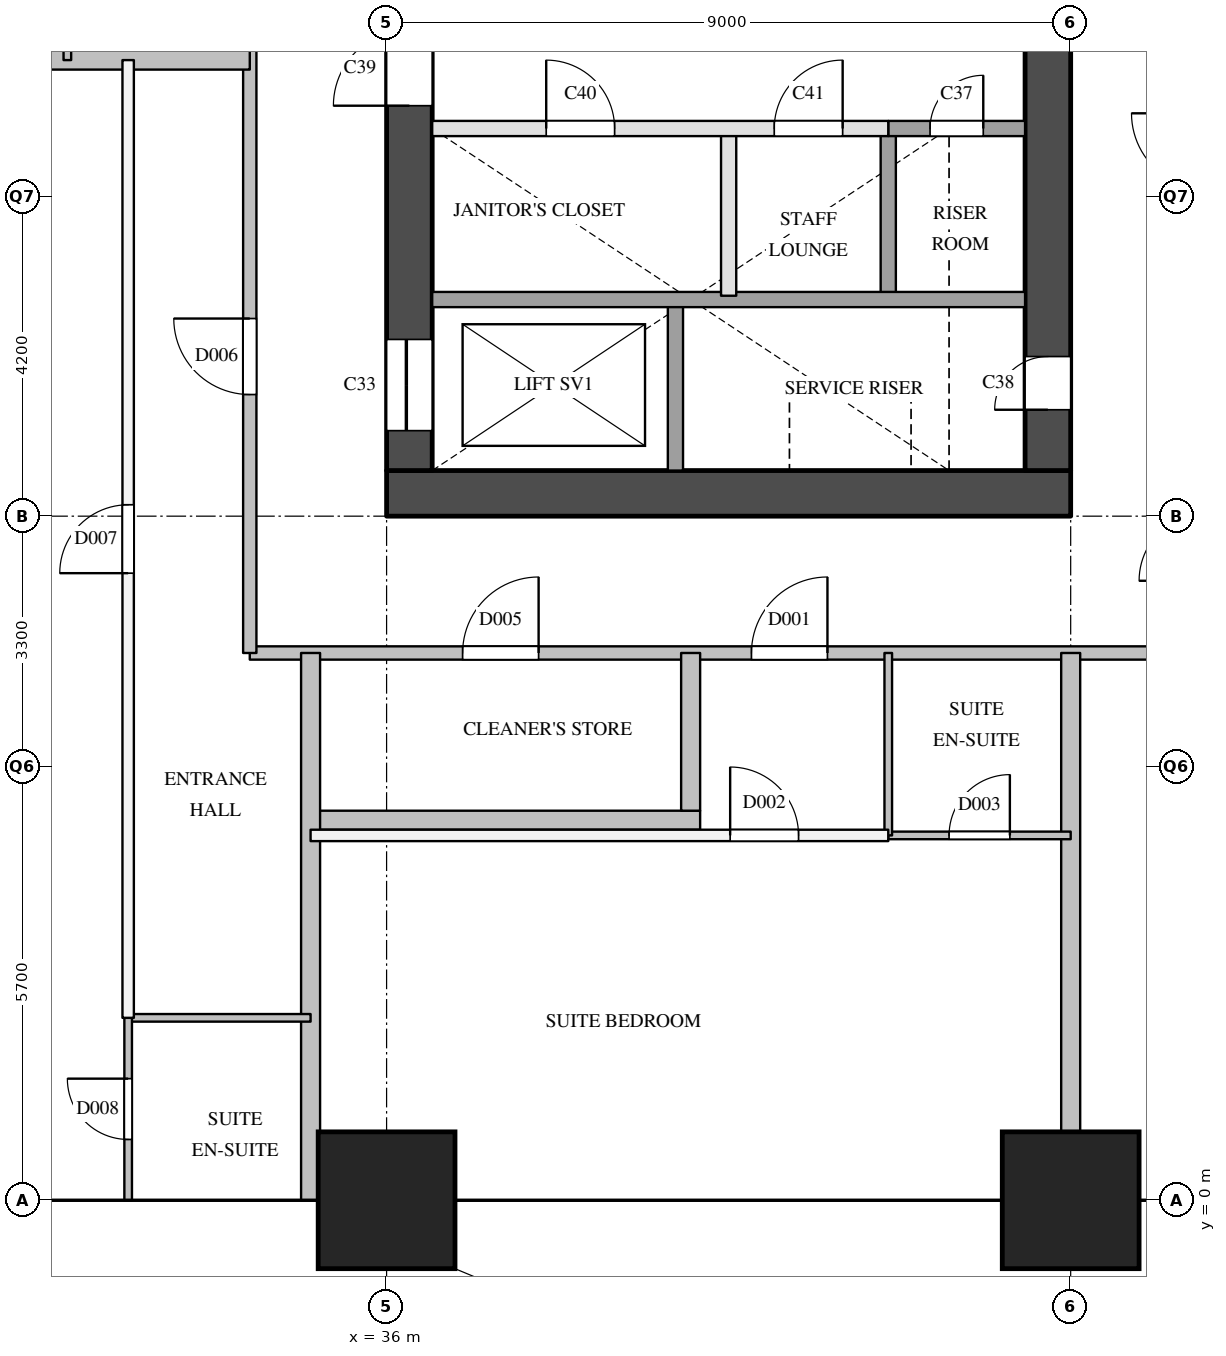
"""IFC4 building model, lengths in metres.
Left out: names, types, materials, properties, quantities, classifications, styles, units other than length and angle.
Written with IfcOpenShell. Run it as: python <this file> out.ifc"""

import sys

from ifc_helpers import new_model, si_unit, direction, frame, frame_2d, origin, origin_2d, place, context, subcontext, project, spatial, rectangle, extrude, element, fill, save


model = new_model("IFC4")
c1 = context("Model", 3, precision=1e-05, world=origin(), true_north=direction((0.0, 1.0)))
c2 = subcontext(c1, "Body", "Model", "MODEL_VIEW")
j1 = project(units=[si_unit("LENGTHUNIT", "METRE"), si_unit("PLANEANGLEUNIT", "RADIAN")], contexts=[c1])
p1 = place(None, origin())
s1 = spatial("IfcSite", under=j1, at=p1, CompositionType="ELEMENT")
p2 = place(p1, origin())
s2 = spatial("IfcBuilding", under=s1, at=p2, CompositionType="ELEMENT")
p3 = place(p2, frame((0.0, 0.0, 119.6)))
s3 = spatial("IfcBuildingStorey", under=s2, at=p3, CompositionType="ELEMENT", Elevation=119.6)
for number, where, z_axis, x_axis in (
    (1, (36.0, 0.0, 0.0), (0.0, 0.0, 1.0), (1.0, 0.0, 0.0)),
    (2, (45.0, 0.0, 0.0), (0.0, 0.0, 1.0), (1.0, 0.0, 0.0)),
):
    element("IfcColumn", number, at=place(p3, frame(where, z_axis=z_axis, x_axis=x_axis)), inside=s3, PredefinedType="COLUMN", context=c2, shape_type="SweptSolid", body=[
        extrude(rectangle(XDim=1.8, YDim=1.8, at=origin_2d()), origin(), (0.0, 0.0, 1.0), 3.8),
    ])
p4 = place(p3, frame((36.0, 9.3, 0.0), z_axis=(0.0, 0.0, 1.0), x_axis=(1.0, 0.0, 0.0)))
e3 = element("IfcWall", 3, at=p4, inside=s3, PredefinedType="SHEAR", context=c2, shape_type="SweptSolid", body=[
    extrude(rectangle(XDim=9.0, YDim=0.6, at=frame_2d((4.5, 0.0))), origin(), (0.0, 0.0, 1.0), 3.3),
])
p5 = place(p3, frame((36.3, 9.6, 0.0), z_axis=(0.0, 0.0, 1.0), x_axis=(0.0, 1.0, 0.0)))
e4 = element("IfcWall", 4, at=p5, inside=s3, PredefinedType="SHEAR", context=c2, shape_type="SweptSolid", body=[
    extrude(rectangle(XDim=12.3, YDim=0.6, at=frame_2d((6.15, 0.0))), origin(), (0.0, 0.0, 1.0), 3.3),
])
p6 = place(p5, frame((0.525, 0.0, 0.0)))
e5 = element("IfcOpeningElement", 5, at=p6, cuts=e4, PredefinedType="OPENING", context=c2, shape_type="SweptSolid", body=[
    extrude(rectangle(XDim=1.2, YDim=2.1, at=frame_2d((0.6, 1.05))), frame((0.0, 0.31, 0.0), z_axis=(0.0, -1.0, 0.0), x_axis=(1.0, 0.0, 0.0)), (0.0, 0.0, 1.0), 0.62),
])
p7 = place(p5, frame((4.8, 0.0, 0.0)))
e6 = element("IfcOpeningElement", 6, at=p7, cuts=e4, PredefinedType="OPENING", context=c2, shape_type="SweptSolid", body=[
    extrude(rectangle(XDim=1.0, YDim=2.1, at=frame_2d((0.5, 1.05))), frame((0.0, 0.31, 0.0), z_axis=(0.0, -1.0, 0.0), x_axis=(1.0, 0.0, 0.0)), (0.0, 0.0, 1.0), 0.62),
])
p8 = place(p3, frame((44.7, 9.6, 0.0), z_axis=(0.0, 0.0, 1.0), x_axis=(0.0, 1.0, 0.0)))
e7 = element("IfcWall", 7, at=p8, inside=s3, PredefinedType="SHEAR", context=c2, shape_type="SweptSolid", body=[
    extrude(rectangle(XDim=12.3, YDim=0.6, at=frame_2d((6.15, 0.0))), origin(), (0.0, 0.0, 1.0), 3.3),
])
p9 = place(p8, frame((0.8, 0.0, 0.0)))
e8 = element("IfcOpeningElement", 8, at=p9, cuts=e7, PredefinedType="OPENING", context=c2, shape_type="SweptSolid", body=[
    extrude(rectangle(XDim=0.7, YDim=2.1, at=frame_2d((0.35, 1.05))), frame((0.0, 0.31, 0.0), z_axis=(0.0, -1.0, 0.0), x_axis=(1.0, 0.0, 0.0)), (0.0, 0.0, 1.0), 0.62),
])
p10 = place(p3, frame((39.8, 9.6, 0.0), z_axis=(0.0, 0.0, 1.0), x_axis=(0.0, 1.0, 0.0)))
e9 = element("IfcWall", 9, at=p10, inside=s3, PredefinedType="SOLIDWALL", context=c2, shape_type="SweptSolid", body=[
    extrude(rectangle(XDim=2.3, YDim=0.2, at=frame_2d((1.15, 0.0))), origin(), (0.0, 0.0, 1.0), 3.3),
])
p11 = place(p3, frame((40.5, 11.9, 0.0), z_axis=(0.0, 0.0, 1.0), x_axis=(0.0, 1.0, 0.0)))
e10 = element("IfcWall", 10, at=p11, inside=s3, PredefinedType="PARTITIONING", context=c2, shape_type="SweptSolid", body=[
    extrude(rectangle(XDim=2.2, YDim=0.2, at=frame_2d((1.1, 0.0))), origin(), (0.0, 0.0, 1.0), 3.3),
])
p12 = place(p3, frame((42.6, 11.9, 0.0), z_axis=(0.0, 0.0, 1.0), x_axis=(0.0, 1.0, 0.0)))
e11 = element("IfcWall", 11, at=p12, inside=s3, PredefinedType="SOLIDWALL", context=c2, shape_type="SweptSolid", body=[
    extrude(rectangle(XDim=2.2, YDim=0.2, at=frame_2d((1.1, 0.0))), origin(), (0.0, 0.0, 1.0), 3.3),
])
p13 = place(p3, frame((36.6, 11.85, 0.0), z_axis=(0.0, 0.0, 1.0), x_axis=(1.0, 0.0, 0.0)))
e12 = element("IfcWall", 12, at=p13, inside=s3, PredefinedType="SOLIDWALL", context=c2, shape_type="SweptSolid", body=[
    extrude(rectangle(XDim=7.8, YDim=0.2, at=frame_2d((3.9, 0.0))), origin(), (0.0, 0.0, 1.0), 3.3),
])
p14 = place(p3, frame((36.6, 14.1, 0.0), z_axis=(0.0, 0.0, 1.0), x_axis=(1.0, 0.0, 0.0)))
e13 = element("IfcWall", 13, at=p14, inside=s3, PredefinedType="PARTITIONING", context=c2, shape_type="SweptSolid", body=[
    extrude(rectangle(XDim=6.0, YDim=0.2, at=frame_2d((3.0, 0.0))), origin(), (0.0, 0.0, 1.0), 3.3),
])
p15 = place(p14, frame((1.5, 0.0, 0.0)))
e14 = element("IfcOpeningElement", 14, at=p15, cuts=e13, PredefinedType="OPENING", context=c2, shape_type="SweptSolid", body=[
    extrude(rectangle(XDim=0.9, YDim=2.1, at=frame_2d((0.45, 1.05))), frame((0.0, 0.11, 0.0), z_axis=(0.0, -1.0, 0.0), x_axis=(1.0, 0.0, 0.0)), (0.0, 0.0, 1.0), 0.22),
])
p16 = place(p14, frame((4.5, 0.0, 0.0)))
e15 = element("IfcOpeningElement", 15, at=p16, cuts=e13, PredefinedType="OPENING", context=c2, shape_type="SweptSolid", body=[
    extrude(rectangle(XDim=0.9, YDim=2.1, at=frame_2d((0.45, 1.05))), frame((0.0, 0.11, 0.0), z_axis=(0.0, -1.0, 0.0), x_axis=(1.0, 0.0, 0.0)), (0.0, 0.0, 1.0), 0.22),
])
p17 = place(p3, frame((42.6, 14.1, 0.0), z_axis=(0.0, 0.0, 1.0), x_axis=(1.0, 0.0, 0.0)))
e16 = element("IfcWall", 16, at=p17, inside=s3, PredefinedType="SOLIDWALL", context=c2, shape_type="SweptSolid", body=[
    extrude(rectangle(XDim=1.8, YDim=0.2, at=frame_2d((0.9, 0.0))), origin(), (0.0, 0.0, 1.0), 3.3),
])
p18 = place(p17, frame((0.55, 0.0, 0.0)))
e17 = element("IfcOpeningElement", 17, at=p18, cuts=e16, PredefinedType="OPENING", context=c2, shape_type="SweptSolid", body=[
    extrude(rectangle(XDim=0.7, YDim=2.1, at=frame_2d((0.35, 1.05))), frame((0.0, 0.11, 0.0), z_axis=(0.0, -1.0, 0.0), x_axis=(1.0, 0.0, 0.0)), (0.0, 0.0, 1.0), 0.22),
])
p19 = place(p3, frame((34.2, 7.2, 0.0), z_axis=(0.0, 0.0, 1.0), x_axis=(1.0, 0.0, 0.0)))
e18 = element("IfcWall", 18, at=p19, inside=s3, PredefinedType="PARTITIONING", context=c2, shape_type="SweptSolid", body=[
    extrude(rectangle(XDim=12.6, YDim=0.175, at=frame_2d((6.3, 0.0))), origin(), (0.0, 0.0, 1.0), 3.3),
])
p20 = place(p19, frame((6.6, 0.0, 0.0)))
e19 = element("IfcOpeningElement", 19, at=p20, cuts=e18, PredefinedType="OPENING", context=c2, shape_type="SweptSolid", body=[
    extrude(rectangle(XDim=1.0, YDim=2.1, at=frame_2d((0.5, 1.05))), frame((0.0, 0.097, 0.0), z_axis=(0.0, -1.0, 0.0), x_axis=(1.0, 0.0, 0.0)), (0.0, 0.0, 1.0), 0.195),
])
p21 = place(p19, frame((2.8, 0.0, 0.0)))
e20 = element("IfcOpeningElement", 20, at=p21, cuts=e18, PredefinedType="OPENING", context=c2, shape_type="SweptSolid", body=[
    extrude(rectangle(XDim=1.0, YDim=2.1, at=frame_2d((0.5, 1.05))), frame((0.0, 0.097, 0.0), z_axis=(0.0, -1.0, 0.0), x_axis=(1.0, 0.0, 0.0)), (0.0, 0.0, 1.0), 0.195),
])
p22 = place(p3, frame((34.2, 7.2, 0.0), z_axis=(0.0, 0.0, 1.0), x_axis=(0.0, 1.0, 0.0)))
e21 = element("IfcWall", 21, at=p22, inside=s3, PredefinedType="PARTITIONING", context=c2, shape_type="SweptSolid", body=[
    extrude(rectangle(XDim=16.49, YDim=0.175, at=frame_2d((8.245, 0.0))), origin(), (0.0, 0.0, 1.0), 3.3),
])
p23 = place(p22, frame((3.4, 0.0, 0.0)))
e22 = element("IfcOpeningElement", 22, at=p23, cuts=e21, PredefinedType="OPENING", context=c2, shape_type="SweptSolid", body=[
    extrude(rectangle(XDim=1.0, YDim=2.1, at=frame_2d((0.5, 1.05))), frame((0.0, 0.097, 0.0), z_axis=(0.0, -1.0, 0.0), x_axis=(1.0, 0.0, 0.0)), (0.0, 0.0, 1.0), 0.195),
])
p24 = place(p22, frame((11.0, 0.0, 0.0)))
e23 = element("IfcOpeningElement", 23, at=p24, cuts=e21, PredefinedType="OPENING", context=c2, shape_type="SweptSolid", body=[
    extrude(rectangle(XDim=1.0, YDim=2.1, at=frame_2d((0.5, 1.05))), frame((0.0, 0.097, 0.0), z_axis=(0.0, -1.0, 0.0), x_axis=(1.0, 0.0, 0.0)), (0.0, 0.0, 1.0), 0.195),
])
p25 = place(p22, frame((14.195, 0.0, 0.0)))
e24 = element("IfcOpeningElement", 24, at=p25, cuts=e21, PredefinedType="OPENING", context=c2, shape_type="SweptSolid", body=[
    extrude(rectangle(XDim=0.9, YDim=2.1, at=frame_2d((0.45, 1.05))), frame((0.0, 0.097, 0.0), z_axis=(0.0, -1.0, 0.0), x_axis=(1.0, 0.0, 0.0)), (0.0, 0.0, 1.0), 0.195),
])
p26 = place(p3, frame((35.0, 4.8, 0.0), z_axis=(0.0, 0.0, 1.0), x_axis=(1.0, 0.0, 0.0)))
e25 = element("IfcWall", 25, at=p26, inside=s3, PredefinedType="PARTITIONING", context=c2, shape_type="SweptSolid", body=[
    extrude(rectangle(XDim=7.6, YDim=0.15, at=frame_2d((3.8, 0.0))), origin(), (0.0, 0.0, 1.0), 3.3),
])
p27 = place(p26, frame((5.52, 0.0, 0.0)))
e26 = element("IfcOpeningElement", 26, at=p27, cuts=e25, PredefinedType="OPENING", context=c2, shape_type="SweptSolid", body=[
    extrude(rectangle(XDim=0.9, YDim=2.1, at=frame_2d((0.45, 1.05))), frame((0.0, 0.085, 0.0), z_axis=(0.0, -1.0, 0.0), x_axis=(1.0, 0.0, 0.0)), (0.0, 0.0, 1.0), 0.17),
])
p28 = place(p3, frame((32.6, 2.4, 0.0), z_axis=(0.0, 0.0, 1.0), x_axis=(0.0, 1.0, 0.0)))
e27 = element("IfcWall", 27, at=p28, inside=s3, PredefinedType="PARTITIONING", context=c2, shape_type="SweptSolid", body=[
    extrude(rectangle(XDim=12.6, YDim=0.15, at=frame_2d((6.3, 0.0))), origin(), (0.0, 0.0, 1.0), 3.3),
])
p29 = place(p28, frame((5.85, 0.0, 0.0)))
e28 = element("IfcOpeningElement", 28, at=p29, cuts=e27, PredefinedType="OPENING", context=c2, shape_type="SweptSolid", body=[
    extrude(rectangle(XDim=0.9, YDim=2.1, at=frame_2d((0.45, 1.05))), frame((0.0, 0.085, 0.0), z_axis=(0.0, -1.0, 0.0), x_axis=(1.0, 0.0, 0.0)), (0.0, 0.0, 1.0), 0.17),
])
p30 = place(p3, frame((35.0, 5.0, 0.0), z_axis=(0.0, 0.0, 1.0), x_axis=(1.0, 0.0, 0.0)))
e29 = element("IfcWall", 29, at=p30, inside=s3, PredefinedType="PARTITIONING", context=c2, shape_type="SweptSolid", body=[
    extrude(rectangle(XDim=5.125, YDim=0.25, at=frame_2d((2.562, 0.0))), origin(), (0.0, 0.0, 1.0), 3.3),
])
for number, where, z_axis, x_axis in (
    (30, (27.0, 15.0, 0.0), (0.0, 0.0, 1.0), (1.0, 0.0, 0.0)),
    (31, (35.0, 0.0, 0.0), (0.0, 0.0, 1.0), (0.0, 1.0, 0.0)),
):
    element("IfcWall", number, at=place(p3, frame(where, z_axis=z_axis, x_axis=x_axis)), inside=s3, PredefinedType="PARTITIONING", context=c2, shape_type="SweptSolid", body=[
        extrude(rectangle(XDim=7.2, YDim=0.25, at=frame_2d((3.6, 0.0))), origin(), (0.0, 0.0, 1.0), 2.3),
    ])
p31 = place(p3, frame((40.0, 5.125, 0.0), z_axis=(0.0, 0.0, 1.0), x_axis=(0.0, 1.0, 0.0)))
e32 = element("IfcWall", 32, at=p31, inside=s3, PredefinedType="PARTITIONING", context=c2, shape_type="SweptSolid", body=[
    extrude(rectangle(XDim=2.075, YDim=0.25, at=frame_2d((1.038, 0.0))), origin(), (0.0, 0.0, 1.0), 3.3),
])
p32 = place(p3, frame((45.0, 0.0, 0.0), z_axis=(0.0, 0.0, 1.0), x_axis=(0.0, 1.0, 0.0)))
e33 = element("IfcWall", 33, at=p32, inside=s3, PredefinedType="PARTITIONING", context=c2, shape_type="SweptSolid", body=[
    extrude(rectangle(XDim=7.2, YDim=0.25, at=frame_2d((3.6, 0.0))), origin(), (0.0, 0.0, 1.0), 3.3),
])
p33 = place(p3, frame((32.6, 2.4, 0.0), z_axis=(0.0, 0.0, 1.0), x_axis=(1.0, 0.0, 0.0)))
e34 = element("IfcWall", 34, at=p33, inside=s3, PredefinedType="PARTITIONING", context=c2, shape_type="SweptSolid", body=[
    extrude(rectangle(XDim=2.4, YDim=0.1, at=frame_2d((1.2, 0.0))), origin(), (0.0, 0.0, 1.0), 3.3),
])
p34 = place(p3, frame((42.6, 4.8, 0.0), z_axis=(0.0, 0.0, 1.0), x_axis=(1.0, 0.0, 0.0)))
e35 = element("IfcWall", 35, at=p34, inside=s3, PredefinedType="PARTITIONING", context=c2, shape_type="SweptSolid", body=[
    extrude(rectangle(XDim=2.4, YDim=0.1, at=frame_2d((1.2, 0.0))), origin(), (0.0, 0.0, 1.0), 3.3),
])
p35 = place(p34, frame((0.8, 0.0, 0.0)))
e36 = element("IfcOpeningElement", 36, at=p35, cuts=e35, PredefinedType="OPENING", context=c2, shape_type="SweptSolid", body=[
    extrude(rectangle(XDim=0.8, YDim=2.1, at=frame_2d((0.4, 1.05))), frame((0.0, 0.06, 0.0), z_axis=(0.0, -1.0, 0.0), x_axis=(1.0, 0.0, 0.0)), (0.0, 0.0, 1.0), 0.12),
])
p36 = place(p3, frame((31.8, 15.0, 0.0), z_axis=(0.0, 0.0, 1.0), x_axis=(0.0, 1.0, 0.0)))
e37 = element("IfcWall", 37, at=p36, inside=s3, PredefinedType="PARTITIONING", context=c2, shape_type="SweptSolid", body=[
    extrude(rectangle(XDim=2.4, YDim=0.1, at=frame_2d((1.2, 0.0))), origin(), (0.0, 0.0, 1.0), 3.3),
])
p37 = place(p36, frame((0.8, 0.0, 0.0)))
e38 = element("IfcOpeningElement", 38, at=p37, cuts=e37, PredefinedType="OPENING", context=c2, shape_type="SweptSolid", body=[
    extrude(rectangle(XDim=0.8, YDim=2.1, at=frame_2d((0.4, 1.05))), frame((0.0, 0.06, 0.0), z_axis=(0.0, -1.0, 0.0), x_axis=(1.0, 0.0, 0.0)), (0.0, 0.0, 1.0), 0.12),
])
p38 = place(p3, frame((32.6, 0.0, 0.0), z_axis=(0.0, 0.0, 1.0), x_axis=(0.0, 1.0, 0.0)))
e39 = element("IfcWall", 39, at=p38, inside=s3, PredefinedType="PARTITIONING", context=c2, shape_type="SweptSolid", body=[
    extrude(rectangle(XDim=2.4, YDim=0.1, at=frame_2d((1.2, 0.0))), origin(), (0.0, 0.0, 1.0), 2.3),
])
p39 = place(p38, frame((0.8, 0.0, 0.0)))
e40 = element("IfcOpeningElement", 40, at=p39, cuts=e39, PredefinedType="OPENING", context=c2, shape_type="SweptSolid", body=[
    extrude(rectangle(XDim=0.8, YDim=2.1, at=frame_2d((0.4, 1.05))), frame((0.0, 0.06, 0.0), z_axis=(0.0, -1.0, 0.0), x_axis=(1.0, 0.0, 0.0)), (0.0, 0.0, 1.0), 0.12),
])
p40 = place(p3, frame((42.6, 4.8, 0.0), z_axis=(0.0, 0.0, 1.0), x_axis=(0.0, 1.0, 0.0)))
e41 = element("IfcWall", 41, at=p40, inside=s3, PredefinedType="PARTITIONING", context=c2, shape_type="SweptSolid", body=[
    extrude(rectangle(XDim=2.4, YDim=0.1, at=frame_2d((1.2, 0.0))), origin(), (0.0, 0.0, 1.0), 3.3),
])
p41 = place(p6, origin())
e42 = element("IfcDoor", 42, at=p41, inside=s3, OperationType="SLIDING_TO_LEFT", PredefinedType="DOOR", context=c2, shape_type="SweptSolid", body=[
    extrude(rectangle(XDim=1.2, YDim=2.1, at=frame_2d((0.6, 1.05))), frame((0.0, 0.025, 0.0), z_axis=(0.0, -1.0, 0.0), x_axis=(1.0, 0.0, 0.0)), (0.0, 0.0, 1.0), 0.05),
])
fill(e5, e42)
p42 = place(p18, origin())
e43 = element("IfcDoor", 43, at=p42, inside=s3, OperationType="SINGLE_SWING_RIGHT", PredefinedType="DOOR", context=c2, shape_type="SweptSolid", body=[
    extrude(rectangle(XDim=0.7, YDim=2.1, at=frame_2d((0.35, 1.05))), frame((0.0, 0.025, 0.0), z_axis=(0.0, -1.0, 0.0), x_axis=(1.0, 0.0, 0.0)), (0.0, 0.0, 1.0), 0.05),
])
fill(e17, e43)
p43 = place(p9, origin())
e44 = element("IfcDoor", 44, at=p43, inside=s3, OperationType="SINGLE_SWING_LEFT", PredefinedType="DOOR", context=c2, shape_type="SweptSolid", body=[
    extrude(rectangle(XDim=0.7, YDim=2.1, at=frame_2d((0.35, 1.05))), frame((0.0, 0.025, 0.0), z_axis=(0.0, -1.0, 0.0), x_axis=(1.0, 0.0, 0.0)), (0.0, 0.0, 1.0), 0.05),
])
fill(e8, e44)
p44 = place(p7, origin())
e45 = element("IfcDoor", 45, at=p44, inside=s3, OperationType="SINGLE_SWING_LEFT", PredefinedType="DOOR", context=c2, shape_type="SweptSolid", body=[
    extrude(rectangle(XDim=1.0, YDim=2.1, at=frame_2d((0.5, 1.05))), frame((0.0, 0.025, 0.0), z_axis=(0.0, -1.0, 0.0), x_axis=(1.0, 0.0, 0.0)), (0.0, 0.0, 1.0), 0.05),
])
fill(e6, e45)
p45 = place(p15, origin())
e46 = element("IfcDoor", 46, at=p45, inside=s3, OperationType="SINGLE_SWING_LEFT", PredefinedType="DOOR", context=c2, shape_type="SweptSolid", body=[
    extrude(rectangle(XDim=0.9, YDim=2.1, at=frame_2d((0.45, 1.05))), frame((0.0, 0.025, 0.0), z_axis=(0.0, -1.0, 0.0), x_axis=(1.0, 0.0, 0.0)), (0.0, 0.0, 1.0), 0.05),
])
fill(e14, e46)
p46 = place(p16, origin())
e47 = element("IfcDoor", 47, at=p46, inside=s3, OperationType="SINGLE_SWING_RIGHT", PredefinedType="DOOR", context=c2, shape_type="SweptSolid", body=[
    extrude(rectangle(XDim=0.9, YDim=2.1, at=frame_2d((0.45, 1.05))), frame((0.0, 0.025, 0.0), z_axis=(0.0, -1.0, 0.0), x_axis=(1.0, 0.0, 0.0)), (0.0, 0.0, 1.0), 0.05),
])
fill(e15, e47)
p47 = place(p20, origin())
e48 = element("IfcDoor", 48, at=p47, inside=s3, OperationType="SINGLE_SWING_RIGHT", PredefinedType="DOOR", context=c2, shape_type="SweptSolid", body=[
    extrude(rectangle(XDim=1.0, YDim=2.1, at=frame_2d((0.5, 1.05))), frame((0.0, 0.025, 0.0), z_axis=(0.0, -1.0, 0.0), x_axis=(1.0, 0.0, 0.0)), (0.0, 0.0, 1.0), 0.05),
])
fill(e19, e48)
p48 = place(p27, origin())
e49 = element("IfcDoor", 49, at=p48, inside=s3, OperationType="SINGLE_SWING_LEFT", PredefinedType="DOOR", context=c2, shape_type="SweptSolid", body=[
    extrude(rectangle(XDim=0.9, YDim=2.1, at=frame_2d((0.45, 1.05))), frame((0.0, 0.025, 0.0), z_axis=(0.0, -1.0, 0.0), x_axis=(1.0, 0.0, 0.0)), (0.0, 0.0, 1.0), 0.05),
])
fill(e26, e49)
p49 = place(p35, origin())
e50 = element("IfcDoor", 50, at=p49, inside=s3, OperationType="SINGLE_SWING_RIGHT", PredefinedType="DOOR", context=c2, shape_type="SweptSolid", body=[
    extrude(rectangle(XDim=0.8, YDim=2.1, at=frame_2d((0.4, 1.05))), frame((0.0, 0.025, 0.0), z_axis=(0.0, -1.0, 0.0), x_axis=(1.0, 0.0, 0.0)), (0.0, 0.0, 1.0), 0.05),
])
fill(e36, e50)
p50 = place(p21, origin())
e51 = element("IfcDoor", 51, at=p50, inside=s3, OperationType="SINGLE_SWING_RIGHT", PredefinedType="DOOR", context=c2, shape_type="SweptSolid", body=[
    extrude(rectangle(XDim=1.0, YDim=2.1, at=frame_2d((0.5, 1.05))), frame((0.0, 0.025, 0.0), z_axis=(0.0, -1.0, 0.0), x_axis=(1.0, 0.0, 0.0)), (0.0, 0.0, 1.0), 0.05),
])
fill(e20, e51)
p51 = place(p23, origin())
e52 = element("IfcDoor", 52, at=p51, inside=s3, OperationType="SINGLE_SWING_RIGHT", PredefinedType="DOOR", context=c2, shape_type="SweptSolid", body=[
    extrude(rectangle(XDim=1.0, YDim=2.1, at=frame_2d((0.5, 1.05))), frame((0.0, 0.025, 0.0), z_axis=(0.0, -1.0, 0.0), x_axis=(1.0, 0.0, 0.0)), (0.0, 0.0, 1.0), 0.05),
])
fill(e22, e52)
p52 = place(p29, origin())
e53 = element("IfcDoor", 53, at=p52, inside=s3, OperationType="SINGLE_SWING_LEFT", PredefinedType="DOOR", context=c2, shape_type="SweptSolid", body=[
    extrude(rectangle(XDim=0.9, YDim=2.1, at=frame_2d((0.45, 1.05))), frame((0.0, 0.025, 0.0), z_axis=(0.0, -1.0, 0.0), x_axis=(1.0, 0.0, 0.0)), (0.0, 0.0, 1.0), 0.05),
])
fill(e28, e53)
p53 = place(p39, origin())
e54 = element("IfcDoor", 54, at=p53, inside=s3, OperationType="SINGLE_SWING_RIGHT", PredefinedType="DOOR", context=c2, shape_type="SweptSolid", body=[
    extrude(rectangle(XDim=0.8, YDim=2.1, at=frame_2d((0.4, 1.05))), frame((0.0, 0.025, 0.0), z_axis=(0.0, -1.0, 0.0), x_axis=(1.0, 0.0, 0.0)), (0.0, 0.0, 1.0), 0.05),
])
fill(e40, e54)
save(model, sys.argv[1])
